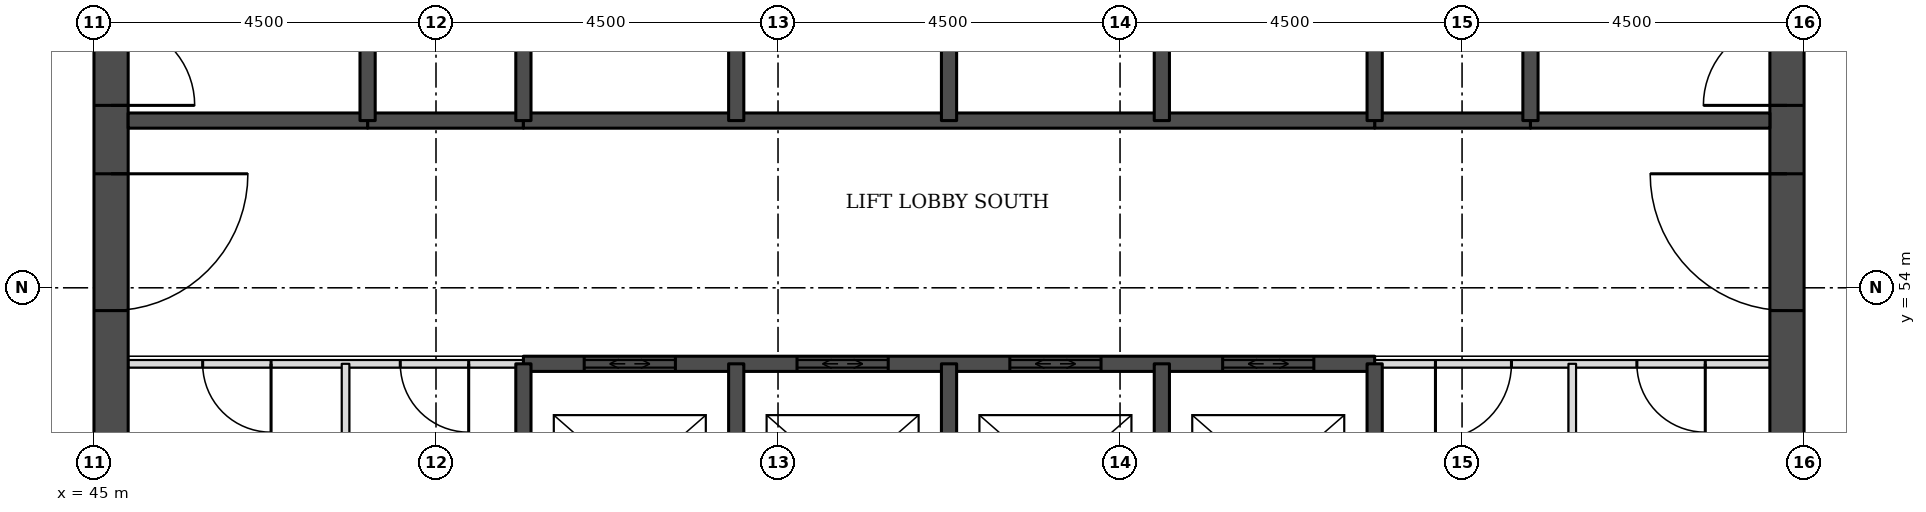
"""IFC4 building model, lengths in metres.
Left out: names, types, materials, properties, quantities, classifications, styles, units other than length and angle.
Written with IfcOpenShell. Run it as: python <this file> out.ifc"""

import sys

from ifc_helpers import new_model, si_unit, direction, frame, frame_2d, origin, place, context, subcontext, project, spatial, rectangle, extrude, element, fill, save


model = new_model("IFC4")
c1 = context("Model", 3, precision=1e-05, world=origin(), true_north=direction((0.0, 1.0)))
c2 = subcontext(c1, "Body", "Model", "MODEL_VIEW")
j1 = project(units=[si_unit("LENGTHUNIT", "METRE"), si_unit("PLANEANGLEUNIT", "RADIAN")], contexts=[c1])
p1 = place(None, origin())
s1 = spatial("IfcSite", under=j1, at=p1, CompositionType="ELEMENT")
p2 = place(p1, origin())
s2 = spatial("IfcBuilding", under=s1, at=p2, CompositionType="ELEMENT")
p3 = place(p2, frame((0.0, 0.0, 115.9)))
s3 = spatial("IfcBuildingStorey", under=s2, at=p3, CompositionType="ELEMENT", Elevation=115.9)
p4 = place(p3, frame((45.225, 49.5, 0.0), z_axis=(0.0, 0.0, 1.0), x_axis=(0.0, 1.0, 0.0)))
e1 = element("IfcWall", 1, at=p4, inside=s3, PredefinedType="SHEAR", context=c2, shape_type="SweptSolid", body=[
    extrude(rectangle(XDim=22.5, YDim=0.45, at=frame_2d((11.25, 0.0))), origin(), (0.0, 0.0, 1.0), 3.7),
])
p5 = place(p4, frame((4.2, 0.0, 0.0)))
e2 = element("IfcOpeningElement", 2, at=p5, cuts=e1, PredefinedType="OPENING", context=c2, shape_type="SweptSolid", body=[
    extrude(rectangle(XDim=1.8, YDim=2.1, at=frame_2d((0.9, 1.05))), frame((0.0, 0.235, 0.0), z_axis=(0.0, -1.0, 0.0), x_axis=(1.0, 0.0, 0.0)), (0.0, 0.0, 1.0), 0.47),
])
p6 = place(p4, frame((6.9, 0.0, 0.0)))
e3 = element("IfcOpeningElement", 3, at=p6, cuts=e1, PredefinedType="OPENING", context=c2, shape_type="SweptSolid", body=[
    extrude(rectangle(XDim=1.1, YDim=2.1, at=frame_2d((0.55, 1.05))), frame((0.0, 0.235, 0.0), z_axis=(0.0, -1.0, 0.0), x_axis=(1.0, 0.0, 0.0)), (0.0, 0.0, 1.0), 0.47),
])
p7 = place(p4, frame((13.6, 0.0, 0.0)))
e4 = element("IfcOpeningElement", 4, at=p7, cuts=e1, PredefinedType="OPENING", context=c2, shape_type="SweptSolid", body=[
    extrude(rectangle(XDim=1.1, YDim=2.1, at=frame_2d((0.55, 1.05))), frame((0.0, 0.235, 0.0), z_axis=(0.0, -1.0, 0.0), x_axis=(1.0, 0.0, 0.0)), (0.0, 0.0, 1.0), 0.47),
])
p8 = place(p4, frame((16.5, 0.0, 0.0)))
e5 = element("IfcOpeningElement", 5, at=p8, cuts=e1, PredefinedType="OPENING", context=c2, shape_type="SweptSolid", body=[
    extrude(rectangle(XDim=1.8, YDim=2.1, at=frame_2d((0.9, 1.05))), frame((0.0, 0.235, 0.0), z_axis=(0.0, -1.0, 0.0), x_axis=(1.0, 0.0, 0.0)), (0.0, 0.0, 1.0), 0.47),
])
p9 = place(p3, frame((67.275, 49.5, 0.0), z_axis=(0.0, 0.0, 1.0), x_axis=(0.0, 1.0, 0.0)))
e6 = element("IfcWall", 6, at=p9, inside=s3, PredefinedType="SHEAR", context=c2, shape_type="SweptSolid", body=[
    extrude(rectangle(XDim=22.5, YDim=0.45, at=frame_2d((11.25, 0.0))), origin(), (0.0, 0.0, 1.0), 3.7),
])
p10 = place(p9, frame((4.2, 0.0, 0.0)))
e7 = element("IfcOpeningElement", 7, at=p10, cuts=e6, PredefinedType="OPENING", context=c2, shape_type="SweptSolid", body=[
    extrude(rectangle(XDim=1.8, YDim=2.1, at=frame_2d((0.9, 1.05))), frame((0.0, 0.235, 0.0), z_axis=(0.0, -1.0, 0.0), x_axis=(1.0, 0.0, 0.0)), (0.0, 0.0, 1.0), 0.47),
])
p11 = place(p9, frame((6.9, 0.0, 0.0)))
e8 = element("IfcOpeningElement", 8, at=p11, cuts=e6, PredefinedType="OPENING", context=c2, shape_type="SweptSolid", body=[
    extrude(rectangle(XDim=1.1, YDim=2.1, at=frame_2d((0.55, 1.05))), frame((0.0, 0.235, 0.0), z_axis=(0.0, -1.0, 0.0), x_axis=(1.0, 0.0, 0.0)), (0.0, 0.0, 1.0), 0.47),
])
p12 = place(p9, frame((13.6, 0.0, 0.0)))
e9 = element("IfcOpeningElement", 9, at=p12, cuts=e6, PredefinedType="OPENING", context=c2, shape_type="SweptSolid", body=[
    extrude(rectangle(XDim=1.1, YDim=2.1, at=frame_2d((0.55, 1.05))), frame((0.0, 0.235, 0.0), z_axis=(0.0, -1.0, 0.0), x_axis=(1.0, 0.0, 0.0)), (0.0, 0.0, 1.0), 0.47),
])
p13 = place(p9, frame((16.5, 0.0, 0.0)))
e10 = element("IfcOpeningElement", 10, at=p13, cuts=e6, PredefinedType="OPENING", context=c2, shape_type="SweptSolid", body=[
    extrude(rectangle(XDim=1.8, YDim=2.1, at=frame_2d((0.9, 1.05))), frame((0.0, 0.235, 0.0), z_axis=(0.0, -1.0, 0.0), x_axis=(1.0, 0.0, 0.0)), (0.0, 0.0, 1.0), 0.47),
])
p14 = place(p3, frame((45.45, 53.0, 0.0), z_axis=(0.0, 0.0, 1.0), x_axis=(1.0, 0.0, 0.0)))
e11 = element("IfcWall", 11, at=p14, inside=s3, PredefinedType="PARTITIONING", context=c2, shape_type="SweptSolid", body=[
    extrude(rectangle(XDim=5.2, YDim=0.1, at=frame_2d((2.6, 0.0))), origin(), (0.0, 0.0, 1.0), 3.55),
])
p15 = place(p14, frame((0.98, 0.0, 0.0)))
e12 = element("IfcOpeningElement", 12, at=p15, cuts=e11, PredefinedType="OPENING", context=c2, shape_type="SweptSolid", body=[
    extrude(rectangle(XDim=0.9, YDim=2.1, at=frame_2d((0.45, 1.05))), frame((0.0, 0.06, 0.0), z_axis=(0.0, -1.0, 0.0), x_axis=(1.0, 0.0, 0.0)), (0.0, 0.0, 1.0), 0.12),
])
p16 = place(p14, frame((3.58, 0.0, 0.0)))
e13 = element("IfcOpeningElement", 13, at=p16, cuts=e11, PredefinedType="OPENING", context=c2, shape_type="SweptSolid", body=[
    extrude(rectangle(XDim=0.9, YDim=2.1, at=frame_2d((0.45, 1.05))), frame((0.0, 0.06, 0.0), z_axis=(0.0, -1.0, 0.0), x_axis=(1.0, 0.0, 0.0)), (0.0, 0.0, 1.0), 0.12),
])
p17 = place(p3, frame((61.85, 53.0, 0.0), z_axis=(0.0, 0.0, 1.0), x_axis=(1.0, 0.0, 0.0)))
e14 = element("IfcWall", 14, at=p17, inside=s3, PredefinedType="PARTITIONING", context=c2, shape_type="SweptSolid", body=[
    extrude(rectangle(XDim=5.2, YDim=0.1, at=frame_2d((2.6, 0.0))), origin(), (0.0, 0.0, 1.0), 3.55),
])
p18 = place(p17, frame((3.45, 0.0, 0.0)))
e15 = element("IfcOpeningElement", 15, at=p18, cuts=e14, PredefinedType="OPENING", context=c2, shape_type="SweptSolid", body=[
    extrude(rectangle(XDim=0.9, YDim=2.1, at=frame_2d((0.45, 1.05))), frame((0.0, 0.06, 0.0), z_axis=(0.0, -1.0, 0.0), x_axis=(1.0, 0.0, 0.0)), (0.0, 0.0, 1.0), 0.12),
])
p19 = place(p17, frame((0.8, 0.0, 0.0)))
e16 = element("IfcOpeningElement", 16, at=p19, cuts=e14, PredefinedType="OPENING", context=c2, shape_type="SweptSolid", body=[
    extrude(rectangle(XDim=1.0, YDim=2.1, at=frame_2d((0.5, 1.05))), frame((0.0, 0.06, 0.0), z_axis=(0.0, -1.0, 0.0), x_axis=(1.0, 0.0, 0.0)), (0.0, 0.0, 1.0), 0.12),
])
p20 = place(p3, frame((50.65, 53.0, 0.0), z_axis=(0.0, 0.0, 1.0), x_axis=(1.0, 0.0, 0.0)))
e17 = element("IfcWall", 17, at=p20, inside=s3, PredefinedType="SOLIDWALL", context=c2, shape_type="SweptSolid", body=[
    extrude(rectangle(XDim=11.2, YDim=0.2, at=frame_2d((5.6, 0.0))), origin(), (0.0, 0.0, 1.0), 3.55),
])
p21 = place(p20, frame((0.8, 0.0, 0.0)))
e18 = element("IfcOpeningElement", 18, at=p21, cuts=e17, PredefinedType="OPENING", context=c2, shape_type="SweptSolid", body=[
    extrude(rectangle(XDim=1.2, YDim=2.1, at=frame_2d((0.6, 1.05))), frame((0.0, 0.11, 0.0), z_axis=(0.0, -1.0, 0.0), x_axis=(1.0, 0.0, 0.0)), (0.0, 0.0, 1.0), 0.22),
])
p22 = place(p20, frame((3.6, 0.0, 0.0)))
e19 = element("IfcOpeningElement", 19, at=p22, cuts=e17, PredefinedType="OPENING", context=c2, shape_type="SweptSolid", body=[
    extrude(rectangle(XDim=1.2, YDim=2.1, at=frame_2d((0.6, 1.05))), frame((0.0, 0.11, 0.0), z_axis=(0.0, -1.0, 0.0), x_axis=(1.0, 0.0, 0.0)), (0.0, 0.0, 1.0), 0.22),
])
p23 = place(p20, frame((6.4, 0.0, 0.0)))
e20 = element("IfcOpeningElement", 20, at=p23, cuts=e17, PredefinedType="OPENING", context=c2, shape_type="SweptSolid", body=[
    extrude(rectangle(XDim=1.2, YDim=2.1, at=frame_2d((0.6, 1.05))), frame((0.0, 0.11, 0.0), z_axis=(0.0, -1.0, 0.0), x_axis=(1.0, 0.0, 0.0)), (0.0, 0.0, 1.0), 0.22),
])
p24 = place(p20, frame((9.2, 0.0, 0.0)))
e21 = element("IfcOpeningElement", 21, at=p24, cuts=e17, PredefinedType="OPENING", context=c2, shape_type="SweptSolid", body=[
    extrude(rectangle(XDim=1.2, YDim=2.1, at=frame_2d((0.6, 1.05))), frame((0.0, 0.11, 0.0), z_axis=(0.0, -1.0, 0.0), x_axis=(1.0, 0.0, 0.0)), (0.0, 0.0, 1.0), 0.22),
])
for number, where, z_axis, x_axis in (
    (22, (48.6, 56.2, 0.0), (0.0, 0.0, 1.0), (1.0, 0.0, 0.0)),
    (23, (61.85, 56.2, 0.0), (0.0, 0.0, 1.0), (1.0, 0.0, 0.0)),
):
    element("IfcWall", number, at=place(p3, frame(where, z_axis=z_axis, x_axis=x_axis)), inside=s3, PredefinedType="SOLIDWALL", context=c2, shape_type="SweptSolid", body=[
        extrude(rectangle(XDim=2.05, YDim=0.2, at=frame_2d((1.025, 0.0))), origin(), (0.0, 0.0, 1.0), 3.55),
    ])
p25 = place(p3, frame((45.45, 56.2, 0.0), z_axis=(0.0, 0.0, 1.0), x_axis=(1.0, 0.0, 0.0)))
e24 = element("IfcWall", 24, at=p25, inside=s3, PredefinedType="SOLIDWALL", context=c2, shape_type="SweptSolid", body=[
    extrude(rectangle(XDim=3.15, YDim=0.2, at=frame_2d((1.575, 0.0))), origin(), (0.0, 0.0, 1.0), 3.55),
])
p26 = place(p3, frame((50.65, 56.2, 0.0), z_axis=(0.0, 0.0, 1.0), x_axis=(1.0, 0.0, 0.0)))
e25 = element("IfcWall", 25, at=p26, inside=s3, PredefinedType="SOLIDWALL", context=c2, shape_type="SweptSolid", body=[
    extrude(rectangle(XDim=11.2, YDim=0.2, at=frame_2d((5.6, 0.0))), origin(), (0.0, 0.0, 1.0), 3.55),
])
p27 = place(p3, frame((63.9, 56.2, 0.0), z_axis=(0.0, 0.0, 1.0), x_axis=(1.0, 0.0, 0.0)))
e26 = element("IfcWall", 26, at=p27, inside=s3, PredefinedType="SOLIDWALL", context=c2, shape_type="SweptSolid", body=[
    extrude(rectangle(XDim=3.15, YDim=0.2, at=frame_2d((1.575, 0.0))), origin(), (0.0, 0.0, 1.0), 3.55),
])
p28 = place(p3, frame((48.31, 49.95, 0.0), z_axis=(0.0, 0.0, 1.0), x_axis=(0.0, 1.0, 0.0)))
e27 = element("IfcWall", 27, at=p28, inside=s3, PredefinedType="PARTITIONING", context=c2, shape_type="SweptSolid", body=[
    extrude(rectangle(XDim=3.05, YDim=0.1, at=frame_2d((1.525, 0.0))), origin(), (0.0, 0.0, 1.0), 3.55),
])
p29 = place(p3, frame((48.6, 56.2, 0.0), z_axis=(0.0, 0.0, 1.0), x_axis=(0.0, 1.0, 0.0)))
e28 = element("IfcWall", 28, at=p29, inside=s3, PredefinedType="SOLIDWALL", context=c2, shape_type="SweptSolid", body=[
    extrude(rectangle(XDim=5.8, YDim=0.2, at=frame_2d((2.9, 0.0))), origin(), (0.0, 0.0, 1.0), 3.55),
])
p30 = place(p3, frame((50.65, 49.95, 0.0), z_axis=(0.0, 0.0, 1.0), x_axis=(0.0, 1.0, 0.0)))
e29 = element("IfcWall", 29, at=p30, inside=s3, PredefinedType="SOLIDWALL", context=c2, shape_type="SweptSolid", body=[
    extrude(rectangle(XDim=3.05, YDim=0.2, at=frame_2d((1.525, 0.0))), origin(), (0.0, 0.0, 1.0), 3.55),
])
p31 = place(p3, frame((50.65, 56.2, 0.0), z_axis=(0.0, 0.0, 1.0), x_axis=(0.0, 1.0, 0.0)))
e30 = element("IfcWall", 30, at=p31, inside=s3, PredefinedType="SOLIDWALL", context=c2, shape_type="SweptSolid", body=[
    extrude(rectangle(XDim=2.8, YDim=0.2, at=frame_2d((1.4, 0.0))), origin(), (0.0, 0.0, 1.0), 3.55),
])
p32 = place(p3, frame((53.45, 49.95, 0.0), z_axis=(0.0, 0.0, 1.0), x_axis=(0.0, 1.0, 0.0)))
e31 = element("IfcWall", 31, at=p32, inside=s3, PredefinedType="SOLIDWALL", context=c2, shape_type="SweptSolid", body=[
    extrude(rectangle(XDim=3.05, YDim=0.2, at=frame_2d((1.525, 0.0))), origin(), (0.0, 0.0, 1.0), 3.55),
])
p33 = place(p3, frame((53.45, 56.2, 0.0), z_axis=(0.0, 0.0, 1.0), x_axis=(0.0, 1.0, 0.0)))
e32 = element("IfcWall", 32, at=p33, inside=s3, PredefinedType="SOLIDWALL", context=c2, shape_type="SweptSolid", body=[
    extrude(rectangle(XDim=2.8, YDim=0.2, at=frame_2d((1.4, 0.0))), origin(), (0.0, 0.0, 1.0), 3.55),
])
p34 = place(p3, frame((56.25, 49.95, 0.0), z_axis=(0.0, 0.0, 1.0), x_axis=(0.0, 1.0, 0.0)))
e33 = element("IfcWall", 33, at=p34, inside=s3, PredefinedType="SOLIDWALL", context=c2, shape_type="SweptSolid", body=[
    extrude(rectangle(XDim=3.05, YDim=0.2, at=frame_2d((1.525, 0.0))), origin(), (0.0, 0.0, 1.0), 3.55),
])
p35 = place(p3, frame((56.25, 56.2, 0.0), z_axis=(0.0, 0.0, 1.0), x_axis=(0.0, 1.0, 0.0)))
e34 = element("IfcWall", 34, at=p35, inside=s3, PredefinedType="SOLIDWALL", context=c2, shape_type="SweptSolid", body=[
    extrude(rectangle(XDim=2.8, YDim=0.2, at=frame_2d((1.4, 0.0))), origin(), (0.0, 0.0, 1.0), 3.55),
])
p36 = place(p3, frame((59.05, 49.95, 0.0), z_axis=(0.0, 0.0, 1.0), x_axis=(0.0, 1.0, 0.0)))
e35 = element("IfcWall", 35, at=p36, inside=s3, PredefinedType="SOLIDWALL", context=c2, shape_type="SweptSolid", body=[
    extrude(rectangle(XDim=3.05, YDim=0.2, at=frame_2d((1.525, 0.0))), origin(), (0.0, 0.0, 1.0), 3.55),
])
p37 = place(p3, frame((59.05, 56.2, 0.0), z_axis=(0.0, 0.0, 1.0), x_axis=(0.0, 1.0, 0.0)))
e36 = element("IfcWall", 36, at=p37, inside=s3, PredefinedType="SOLIDWALL", context=c2, shape_type="SweptSolid", body=[
    extrude(rectangle(XDim=2.8, YDim=0.2, at=frame_2d((1.4, 0.0))), origin(), (0.0, 0.0, 1.0), 3.55),
])
p38 = place(p3, frame((61.85, 49.95, 0.0), z_axis=(0.0, 0.0, 1.0), x_axis=(0.0, 1.0, 0.0)))
e37 = element("IfcWall", 37, at=p38, inside=s3, PredefinedType="SOLIDWALL", context=c2, shape_type="SweptSolid", body=[
    extrude(rectangle(XDim=3.05, YDim=0.2, at=frame_2d((1.525, 0.0))), origin(), (0.0, 0.0, 1.0), 3.55),
])
p39 = place(p3, frame((61.85, 56.2, 0.0), z_axis=(0.0, 0.0, 1.0), x_axis=(0.0, 1.0, 0.0)))
e38 = element("IfcWall", 38, at=p39, inside=s3, PredefinedType="SOLIDWALL", context=c2, shape_type="SweptSolid", body=[
    extrude(rectangle(XDim=2.8, YDim=0.2, at=frame_2d((1.4, 0.0))), origin(), (0.0, 0.0, 1.0), 3.55),
])
p40 = place(p3, frame((63.9, 56.2, 0.0), z_axis=(0.0, 0.0, 1.0), x_axis=(0.0, 1.0, 0.0)))
e39 = element("IfcWall", 39, at=p40, inside=s3, PredefinedType="SOLIDWALL", context=c2, shape_type="SweptSolid", body=[
    extrude(rectangle(XDim=5.8, YDim=0.2, at=frame_2d((2.9, 0.0))), origin(), (0.0, 0.0, 1.0), 3.55),
])
p41 = place(p3, frame((64.45, 49.95, 0.0), z_axis=(0.0, 0.0, 1.0), x_axis=(0.0, 1.0, 0.0)))
e40 = element("IfcWall", 40, at=p41, inside=s3, PredefinedType="PARTITIONING", context=c2, shape_type="SweptSolid", body=[
    extrude(rectangle(XDim=3.05, YDim=0.1, at=frame_2d((1.525, 0.0))), origin(), (0.0, 0.0, 1.0), 3.55),
])
p42 = place(p21, origin())
e41 = element("IfcDoor", 41, at=p42, inside=s3, OperationType="DOUBLE_DOOR_SLIDING", PredefinedType="DOOR", context=c2, shape_type="SweptSolid", body=[
    extrude(rectangle(XDim=1.2, YDim=2.1, at=frame_2d((0.6, 1.05))), frame((0.0, 0.025, 0.0), z_axis=(0.0, -1.0, 0.0), x_axis=(1.0, 0.0, 0.0)), (0.0, 0.0, 1.0), 0.05),
])
fill(e18, e41)
p43 = place(p22, origin())
e42 = element("IfcDoor", 42, at=p43, inside=s3, OperationType="DOUBLE_DOOR_SLIDING", PredefinedType="DOOR", context=c2, shape_type="SweptSolid", body=[
    extrude(rectangle(XDim=1.2, YDim=2.1, at=frame_2d((0.6, 1.05))), frame((0.0, 0.025, 0.0), z_axis=(0.0, -1.0, 0.0), x_axis=(1.0, 0.0, 0.0)), (0.0, 0.0, 1.0), 0.05),
])
fill(e19, e42)
p44 = place(p23, origin())
e43 = element("IfcDoor", 43, at=p44, inside=s3, OperationType="DOUBLE_DOOR_SLIDING", PredefinedType="DOOR", context=c2, shape_type="SweptSolid", body=[
    extrude(rectangle(XDim=1.2, YDim=2.1, at=frame_2d((0.6, 1.05))), frame((0.0, 0.025, 0.0), z_axis=(0.0, -1.0, 0.0), x_axis=(1.0, 0.0, 0.0)), (0.0, 0.0, 1.0), 0.05),
])
fill(e20, e43)
p45 = place(p24, origin())
e44 = element("IfcDoor", 44, at=p45, inside=s3, OperationType="DOUBLE_DOOR_SLIDING", PredefinedType="DOOR", context=c2, shape_type="SweptSolid", body=[
    extrude(rectangle(XDim=1.2, YDim=2.1, at=frame_2d((0.6, 1.05))), frame((0.0, 0.025, 0.0), z_axis=(0.0, -1.0, 0.0), x_axis=(1.0, 0.0, 0.0)), (0.0, 0.0, 1.0), 0.05),
])
fill(e21, e44)
p46 = place(p5, frame((1.8, 0.0, 0.0), z_axis=(0.0, 0.0, 1.0), x_axis=(-1.0, 0.0, 0.0)))
e45 = element("IfcDoor", 45, at=p46, inside=s3, OperationType="SINGLE_SWING_LEFT", PredefinedType="DOOR", context=c2, shape_type="SweptSolid", body=[
    extrude(rectangle(XDim=1.8, YDim=2.1, at=frame_2d((0.9, 1.05))), frame((0.0, 0.025, 0.0), z_axis=(0.0, -1.0, 0.0), x_axis=(1.0, 0.0, 0.0)), (0.0, 0.0, 1.0), 0.05),
])
fill(e2, e45)
p47 = place(p6, frame((1.1, 0.0, 0.0), z_axis=(0.0, 0.0, 1.0), x_axis=(-1.0, 0.0, 0.0)))
e46 = element("IfcDoor", 46, at=p47, inside=s3, OperationType="SINGLE_SWING_RIGHT", PredefinedType="DOOR", context=c2, shape_type="SweptSolid", body=[
    extrude(rectangle(XDim=1.1, YDim=2.1, at=frame_2d((0.55, 1.05))), frame((0.0, 0.025, 0.0), z_axis=(0.0, -1.0, 0.0), x_axis=(1.0, 0.0, 0.0)), (0.0, 0.0, 1.0), 0.05),
])
fill(e3, e46)
p48 = place(p10, origin())
e47 = element("IfcDoor", 47, at=p48, inside=s3, OperationType="SINGLE_SWING_RIGHT", PredefinedType="DOOR", context=c2, shape_type="SweptSolid", body=[
    extrude(rectangle(XDim=1.8, YDim=2.1, at=frame_2d((0.9, 1.05))), frame((0.0, 0.025, 0.0), z_axis=(0.0, -1.0, 0.0), x_axis=(1.0, 0.0, 0.0)), (0.0, 0.0, 1.0), 0.05),
])
fill(e7, e47)
p49 = place(p11, origin())
e48 = element("IfcDoor", 48, at=p49, inside=s3, OperationType="SINGLE_SWING_LEFT", PredefinedType="DOOR", context=c2, shape_type="SweptSolid", body=[
    extrude(rectangle(XDim=1.1, YDim=2.1, at=frame_2d((0.55, 1.05))), frame((0.0, 0.025, 0.0), z_axis=(0.0, -1.0, 0.0), x_axis=(1.0, 0.0, 0.0)), (0.0, 0.0, 1.0), 0.05),
])
fill(e8, e48)
p50 = place(p18, frame((0.9, 0.0, 0.0), z_axis=(0.0, 0.0, 1.0), x_axis=(-1.0, 0.0, 0.0)))
e49 = element("IfcDoor", 49, at=p50, inside=s3, OperationType="SINGLE_SWING_LEFT", PredefinedType="DOOR", context=c2, shape_type="SweptSolid", body=[
    extrude(rectangle(XDim=0.9, YDim=2.1, at=frame_2d((0.45, 1.05))), frame((0.0, 0.025, 0.0), z_axis=(0.0, -1.0, 0.0), x_axis=(1.0, 0.0, 0.0)), (0.0, 0.0, 1.0), 0.05),
])
fill(e15, e49)
p51 = place(p19, frame((1.0, 0.0, 0.0), z_axis=(0.0, 0.0, 1.0), x_axis=(-1.0, 0.0, 0.0)))
e50 = element("IfcDoor", 50, at=p51, inside=s3, OperationType="SINGLE_SWING_RIGHT", PredefinedType="DOOR", context=c2, shape_type="SweptSolid", body=[
    extrude(rectangle(XDim=1.0, YDim=2.1, at=frame_2d((0.5, 1.05))), frame((0.0, 0.025, 0.0), z_axis=(0.0, -1.0, 0.0), x_axis=(1.0, 0.0, 0.0)), (0.0, 0.0, 1.0), 0.05),
])
fill(e16, e50)
p52 = place(p15, frame((0.9, 0.0, 0.0), z_axis=(0.0, 0.0, 1.0), x_axis=(-1.0, 0.0, 0.0)))
e51 = element("IfcDoor", 51, at=p52, inside=s3, OperationType="SINGLE_SWING_LEFT", PredefinedType="DOOR", context=c2, shape_type="SweptSolid", body=[
    extrude(rectangle(XDim=0.9, YDim=2.1, at=frame_2d((0.45, 1.05))), frame((0.0, 0.025, 0.0), z_axis=(0.0, -1.0, 0.0), x_axis=(1.0, 0.0, 0.0)), (0.0, 0.0, 1.0), 0.05),
])
fill(e12, e51)
p53 = place(p16, frame((0.9, 0.0, 0.0), z_axis=(0.0, 0.0, 1.0), x_axis=(-1.0, 0.0, 0.0)))
e52 = element("IfcDoor", 52, at=p53, inside=s3, OperationType="SINGLE_SWING_LEFT", PredefinedType="DOOR", context=c2, shape_type="SweptSolid", body=[
    extrude(rectangle(XDim=0.9, YDim=2.1, at=frame_2d((0.45, 1.05))), frame((0.0, 0.025, 0.0), z_axis=(0.0, -1.0, 0.0), x_axis=(1.0, 0.0, 0.0)), (0.0, 0.0, 1.0), 0.05),
])
fill(e13, e52)
save(model, sys.argv[1])
